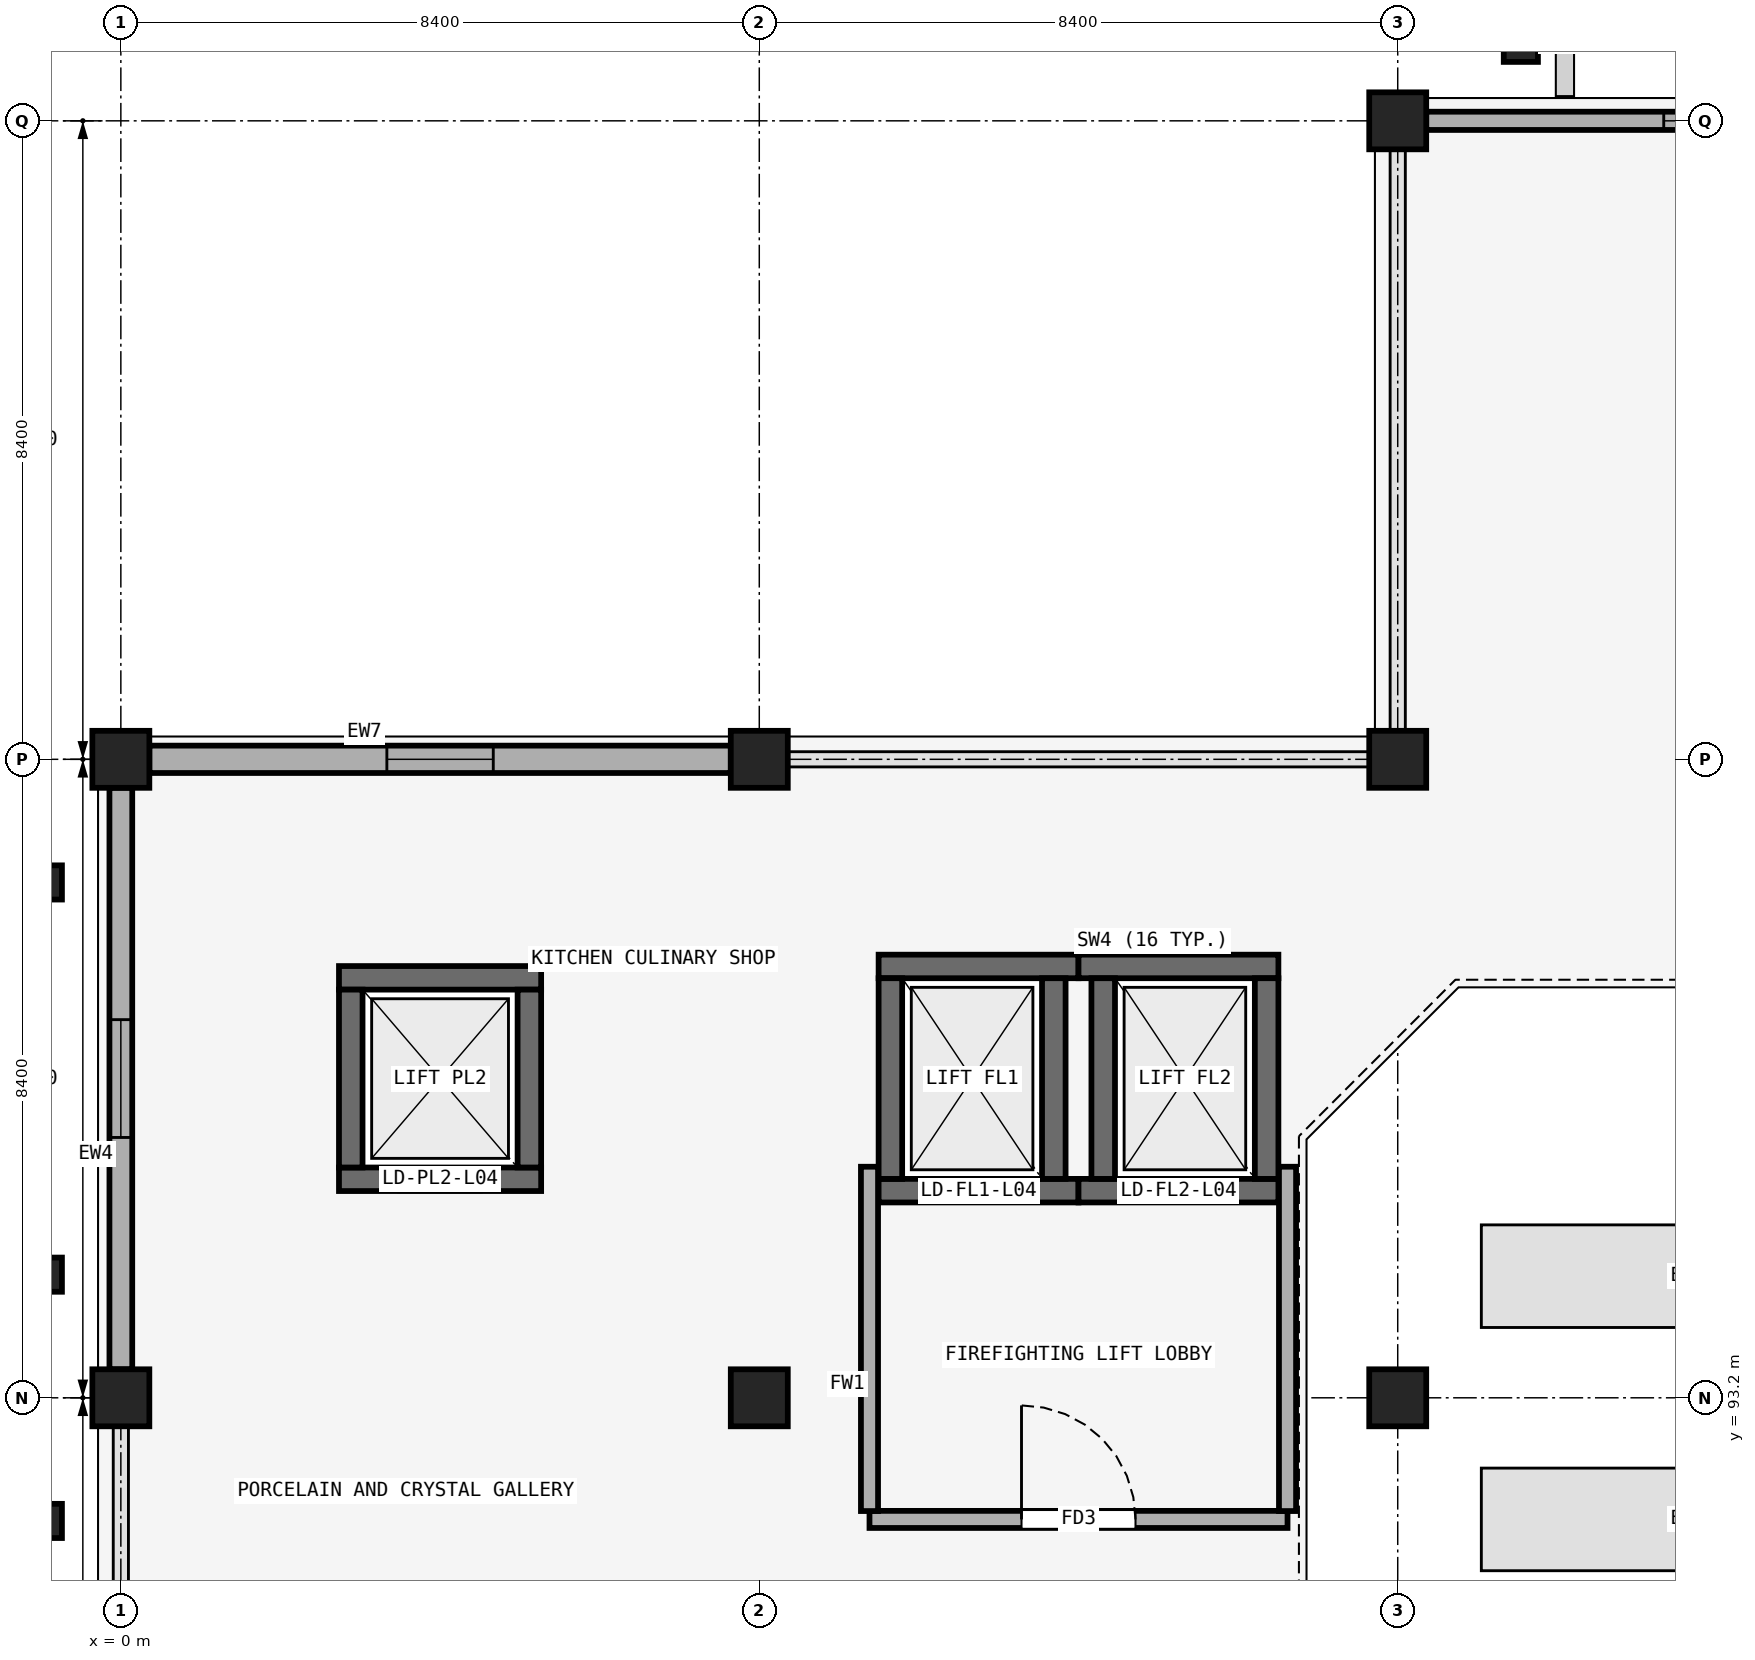
"""IFC4 building model, lengths in metres.
Left out: names, types, materials, properties, quantities, classifications, styles, units other than length and angle.
Written with IfcOpenShell. Run it as: python <this file> out.ifc"""

import sys

from ifc_helpers import new_model, si_unit, direction, frame, frame_2d, origin, origin_2d, place, context, subcontext, project, spatial, rectangle, extrude, element, fill, save


model = new_model("IFC4")
c1 = context("Model", 3, precision=1e-05, world=origin(), true_north=direction((0.0, 1.0)))
c2 = subcontext(c1, "Body", "Model", "MODEL_VIEW")
j1 = project(units=[si_unit("LENGTHUNIT", "METRE"), si_unit("PLANEANGLEUNIT", "RADIAN")], contexts=[c1])
p1 = place(None, origin())
s1 = spatial("IfcSite", under=j1, at=p1, CompositionType="ELEMENT")
p2 = place(p1, origin())
s2 = spatial("IfcBuilding", under=s1, at=p2, CompositionType="ELEMENT")
p3 = place(p2, frame((0.0, 0.0, 18.9)))
s3 = spatial("IfcBuildingStorey", under=s2, at=p3, CompositionType="ELEMENT", Elevation=18.9)
for number, where, z_axis, x_axis in (
    (1, (0.0, 93.2, 0.0), (0.0, 0.0, 1.0), (1.0, 0.0, 0.0)),
    (2, (8.4, 93.2, 0.0), (0.0, 0.0, 1.0), (1.0, 0.0, 0.0)),
    (3, (16.8, 93.2, 0.0), (0.0, 0.0, 1.0), (1.0, 0.0, 0.0)),
    (4, (0.0, 101.6, 0.0), (0.0, 0.0, 1.0), (1.0, 0.0, 0.0)),
    (5, (8.4, 101.6, 0.0), (0.0, 0.0, 1.0), (1.0, 0.0, 0.0)),
    (6, (16.8, 101.6, 0.0), (0.0, 0.0, 1.0), (1.0, 0.0, 0.0)),
    (7, (16.8, 110.0, 0.0), (0.0, 0.0, 1.0), (1.0, 0.0, 0.0)),
):
    element("IfcColumn", number, at=place(p3, frame(where, z_axis=z_axis, x_axis=x_axis)), inside=s3, PredefinedType="COLUMN", context=c2, shape_type="SweptSolid", body=[
        extrude(rectangle(XDim=0.75, YDim=0.75, at=origin_2d()), origin(), (0.0, 0.0, 1.0), 4.5),
    ])
for number, where, z_axis, x_axis in (
    (8, (18.42, 111.05, 0.0), (0.0, 0.0, 1.0), (1.0, 0.0, 0.0)),
    (9, (-1.05, 91.58, 0.0), (0.0, 0.0, 1.0), (0.0, 1.0, 0.0)),
    (10, (-1.05, 94.82, 0.0), (0.0, 0.0, 1.0), (0.0, 1.0, 0.0)),
    (11, (-1.05, 99.98, 0.0), (0.0, 0.0, 1.0), (0.0, 1.0, 0.0)),
):
    element("IfcColumn", number, at=place(p3, frame(where, z_axis=z_axis, x_axis=x_axis)), inside=s3, PredefinedType="PILASTER", context=c2, shape_type="SweptSolid", body=[
        extrude(rectangle(XDim=0.45, YDim=0.55, at=origin_2d()), origin(), (0.0, 0.0, 1.0), 4.5),
    ])
p4 = place(p3, frame((0.375, 101.6, 0.0), z_axis=(0.0, 0.0, 1.0), x_axis=(1.0, 0.0, 0.0)))
e12 = element("IfcWall", 12, at=p4, inside=s3, PredefinedType="SOLIDWALL", context=c2, shape_type="SweptSolid", body=[
    extrude(rectangle(XDim=7.65, YDim=0.36, at=frame_2d((3.825, 0.0))), origin(), (0.0, 0.0, 1.0), 3.45),
])
p5 = place(p4, frame((3.125, 0.0, 0.95)))
e13 = element("IfcOpeningElement", 13, at=p5, cuts=e12, PredefinedType="OPENING", context=c2, shape_type="SweptSolid", body=[
    extrude(rectangle(XDim=1.4, YDim=1.85, at=frame_2d((0.7, 0.925))), frame((0.0, 0.19, 0.0), z_axis=(0.0, -1.0, 0.0), x_axis=(1.0, 0.0, 0.0)), (0.0, 0.0, 1.0), 0.38),
])
p6 = place(p3, frame((17.175, 110.0, 0.0), z_axis=(0.0, 0.0, 1.0), x_axis=(1.0, 0.0, 0.0)))
e14 = element("IfcWall", 14, at=p6, inside=s3, PredefinedType="SOLIDWALL", context=c2, shape_type="SweptSolid", body=[
    extrude(rectangle(XDim=7.65, YDim=0.24, at=frame_2d((3.825, 0.0))), origin(), (0.0, 0.0, 1.0), 3.45),
])
p7 = place(p6, frame((3.125, 0.0, 0.95)))
e15 = element("IfcOpeningElement", 15, at=p7, cuts=e14, PredefinedType="OPENING", context=c2, shape_type="SweptSolid", body=[
    extrude(rectangle(XDim=1.4, YDim=2.1, at=frame_2d((0.7, 1.05))), frame((0.0, 0.13, 0.0), z_axis=(0.0, -1.0, 0.0), x_axis=(1.0, 0.0, 0.0)), (0.0, 0.0, 1.0), 0.26),
])
p8 = place(p3, frame((0.0, 93.575, 0.0), z_axis=(0.0, 0.0, 1.0), x_axis=(0.0, 1.0, 0.0)))
e16 = element("IfcWall", 16, at=p8, inside=s3, PredefinedType="SOLIDWALL", context=c2, shape_type="SweptSolid", body=[
    extrude(rectangle(XDim=7.65, YDim=0.3, at=frame_2d((3.825, 0.0))), origin(), (0.0, 0.0, 1.0), 3.45),
])
p9 = place(p8, frame((3.05, 0.0, 0.95)))
e17 = element("IfcOpeningElement", 17, at=p9, cuts=e16, PredefinedType="OPENING", context=c2, shape_type="SweptSolid", body=[
    extrude(rectangle(XDim=1.55, YDim=1.85, at=frame_2d((0.775, 0.925))), frame((0.0, 0.16, 0.0), z_axis=(0.0, -1.0, 0.0), x_axis=(1.0, 0.0, 0.0)), (0.0, 0.0, 1.0), 0.32),
])
p10 = place(p3, frame((9.97, 95.925, 0.0), z_axis=(0.0, 0.0, 1.0), x_axis=(1.0, 0.0, 0.0)))
e18 = element("IfcWall", 18, at=p10, inside=s3, PredefinedType="SHEAR", context=c2, shape_type="SweptSolid", body=[
    extrude(rectangle(XDim=2.63, YDim=0.31, at=frame_2d((1.315, 0.0))), origin(), (0.0, 0.0, 1.0), 4.2),
])
p11 = place(p10, frame((0.715, 0.0, 0.0)))
e19 = element("IfcOpeningElement", 19, at=p11, cuts=e18, PredefinedType="OPENING", context=c2, shape_type="SweptSolid", body=[
    extrude(rectangle(XDim=1.2, YDim=2.25, at=frame_2d((0.6, 1.125))), frame((0.0, 0.165, 0.0), z_axis=(0.0, -1.0, 0.0), x_axis=(1.0, 0.0, 0.0)), (0.0, 0.0, 1.0), 0.33),
])
p12 = place(p3, frame((9.97, 98.875, 0.0), z_axis=(0.0, 0.0, 1.0), x_axis=(1.0, 0.0, 0.0)))
e20 = element("IfcWall", 20, at=p12, inside=s3, PredefinedType="SHEAR", context=c2, shape_type="SweptSolid", body=[
    extrude(rectangle(XDim=2.63, YDim=0.31, at=frame_2d((1.315, 0.0))), origin(), (0.0, 0.0, 1.0), 4.2),
])
for number, where, z_axis, x_axis in (
    (21, (10.125, 96.08, 0.0), (0.0, 0.0, 1.0), (0.0, 1.0, 0.0)),
    (22, (12.275, 96.08, 0.0), (0.0, 0.0, 1.0), (0.0, 1.0, 0.0)),
):
    element("IfcWall", number, at=place(p3, frame(where, z_axis=z_axis, x_axis=x_axis)), inside=s3, PredefinedType="SHEAR", context=c2, shape_type="SweptSolid", body=[
        extrude(rectangle(XDim=2.64, YDim=0.31, at=frame_2d((1.32, 0.0))), origin(), (0.0, 0.0, 1.0), 4.2),
    ])
p13 = place(p3, frame((12.6, 95.925, 0.0), z_axis=(0.0, 0.0, 1.0), x_axis=(1.0, 0.0, 0.0)))
e23 = element("IfcWall", 23, at=p13, inside=s3, PredefinedType="SHEAR", context=c2, shape_type="SweptSolid", body=[
    extrude(rectangle(XDim=2.63, YDim=0.31, at=frame_2d((1.315, 0.0))), origin(), (0.0, 0.0, 1.0), 4.2),
])
p14 = place(p13, frame((0.715, 0.0, 0.0)))
e24 = element("IfcOpeningElement", 24, at=p14, cuts=e23, PredefinedType="OPENING", context=c2, shape_type="SweptSolid", body=[
    extrude(rectangle(XDim=1.2, YDim=2.25, at=frame_2d((0.6, 1.125))), frame((0.0, 0.165, 0.0), z_axis=(0.0, -1.0, 0.0), x_axis=(1.0, 0.0, 0.0)), (0.0, 0.0, 1.0), 0.33),
])
p15 = place(p3, frame((12.6, 98.875, 0.0), z_axis=(0.0, 0.0, 1.0), x_axis=(1.0, 0.0, 0.0)))
e25 = element("IfcWall", 25, at=p15, inside=s3, PredefinedType="SHEAR", context=c2, shape_type="SweptSolid", body=[
    extrude(rectangle(XDim=2.63, YDim=0.31, at=frame_2d((1.315, 0.0))), origin(), (0.0, 0.0, 1.0), 4.2),
])
for number, where, z_axis, x_axis in (
    (26, (12.925, 96.08, 0.0), (0.0, 0.0, 1.0), (0.0, 1.0, 0.0)),
    (27, (15.075, 96.08, 0.0), (0.0, 0.0, 1.0), (0.0, 1.0, 0.0)),
):
    element("IfcWall", number, at=place(p3, frame(where, z_axis=z_axis, x_axis=x_axis)), inside=s3, PredefinedType="SHEAR", context=c2, shape_type="SweptSolid", body=[
        extrude(rectangle(XDim=2.64, YDim=0.31, at=frame_2d((1.32, 0.0))), origin(), (0.0, 0.0, 1.0), 4.2),
    ])
p16 = place(p3, frame((2.87, 96.075, 0.0), z_axis=(0.0, 0.0, 1.0), x_axis=(1.0, 0.0, 0.0)))
e28 = element("IfcWall", 28, at=p16, inside=s3, PredefinedType="SHEAR", context=c2, shape_type="SweptSolid", body=[
    extrude(rectangle(XDim=2.66, YDim=0.31, at=frame_2d((1.33, 0.0))), origin(), (0.0, 0.0, 1.0), 4.2),
])
p17 = place(p16, frame((0.78, 0.0, 0.0)))
e29 = element("IfcOpeningElement", 29, at=p17, cuts=e28, PredefinedType="OPENING", context=c2, shape_type="SweptSolid", body=[
    extrude(rectangle(XDim=1.1, YDim=2.2, at=frame_2d((0.55, 1.1))), frame((0.0, 0.165, 0.0), z_axis=(0.0, -1.0, 0.0), x_axis=(1.0, 0.0, 0.0)), (0.0, 0.0, 1.0), 0.33),
])
p18 = place(p3, frame((2.87, 98.725, 0.0), z_axis=(0.0, 0.0, 1.0), x_axis=(1.0, 0.0, 0.0)))
e30 = element("IfcWall", 30, at=p18, inside=s3, PredefinedType="SHEAR", context=c2, shape_type="SweptSolid", body=[
    extrude(rectangle(XDim=2.66, YDim=0.31, at=frame_2d((1.33, 0.0))), origin(), (0.0, 0.0, 1.0), 4.2),
])
for number, where, z_axis, x_axis in (
    (31, (3.025, 96.23, 0.0), (0.0, 0.0, 1.0), (0.0, 1.0, 0.0)),
    (32, (5.375, 96.23, 0.0), (0.0, 0.0, 1.0), (0.0, 1.0, 0.0)),
):
    element("IfcWall", number, at=place(p3, frame(where, z_axis=z_axis, x_axis=x_axis)), inside=s3, PredefinedType="SHEAR", context=c2, shape_type="SweptSolid", body=[
        extrude(rectangle(XDim=2.34, YDim=0.31, at=frame_2d((1.17, 0.0))), origin(), (0.0, 0.0, 1.0), 4.2),
    ])
p19 = place(p3, frame((9.85, 91.6, 0.0), z_axis=(0.0, 0.0, 1.0), x_axis=(1.0, 0.0, 0.0)))
e33 = element("IfcWall", 33, at=p19, inside=s3, PredefinedType="PARTITIONING", context=c2, shape_type="SweptSolid", body=[
    extrude(rectangle(XDim=5.5, YDim=0.225, at=frame_2d((2.75, 0.0))), origin(), (0.0, 0.0, 1.0), 4.2),
])
p20 = place(p19, frame((2.0, 0.0, 0.0)))
e34 = element("IfcOpeningElement", 34, at=p20, cuts=e33, PredefinedType="OPENING", context=c2, shape_type="SweptSolid", body=[
    extrude(rectangle(XDim=1.5, YDim=2.25, at=frame_2d((0.75, 1.125))), frame((0.0, 0.123, 0.0), z_axis=(0.0, -1.0, 0.0), x_axis=(1.0, 0.0, 0.0)), (0.0, 0.0, 1.0), 0.245),
])
for number, where, z_axis, x_axis in (
    (35, (9.85, 91.71, 0.0), (0.0, 0.0, 1.0), (0.0, 1.0, 0.0)),
    (36, (15.35, 91.71, 0.0), (0.0, 0.0, 1.0), (0.0, 1.0, 0.0)),
):
    element("IfcWall", number, at=place(p3, frame(where, z_axis=z_axis, x_axis=x_axis)), inside=s3, PredefinedType="PARTITIONING", context=c2, shape_type="SweptSolid", body=[
        extrude(rectangle(XDim=4.53, YDim=0.225, at=frame_2d((2.265, 0.0))), origin(), (0.0, 0.0, 1.0), 3.5),
    ])
p21 = place(p5, origin())
e37 = element("IfcWindow", 37, at=p21, inside=s3, PartitioningType="SINGLE_PANEL", PredefinedType="WINDOW", context=c2, shape_type="SweptSolid", body=[
    extrude(rectangle(XDim=1.4, YDim=1.85, at=frame_2d((0.7, 0.925))), frame((0.0, 0.03, 0.0), z_axis=(0.0, -1.0, 0.0), x_axis=(1.0, 0.0, 0.0)), (0.0, 0.0, 1.0), 0.06),
])
fill(e13, e37)
p22 = place(p7, origin())
e38 = element("IfcWindow", 38, at=p22, inside=s3, PartitioningType="SINGLE_PANEL", PredefinedType="WINDOW", context=c2, shape_type="SweptSolid", body=[
    extrude(rectangle(XDim=1.4, YDim=2.1, at=frame_2d((0.7, 1.05))), frame((0.0, 0.03, 0.0), z_axis=(0.0, -1.0, 0.0), x_axis=(1.0, 0.0, 0.0)), (0.0, 0.0, 1.0), 0.06),
])
fill(e15, e38)
p23 = place(p9, origin())
e39 = element("IfcWindow", 39, at=p23, inside=s3, PartitioningType="SINGLE_PANEL", PredefinedType="WINDOW", context=c2, shape_type="SweptSolid", body=[
    extrude(rectangle(XDim=1.55, YDim=1.85, at=frame_2d((0.775, 0.925))), frame((0.0, 0.03, 0.0), z_axis=(0.0, -1.0, 0.0), x_axis=(1.0, 0.0, 0.0)), (0.0, 0.0, 1.0), 0.06),
])
fill(e17, e39)
p24 = place(p11, origin())
e40 = element("IfcDoor", 40, at=p24, inside=s3, OperationType="SLIDING_TO_LEFT", PredefinedType="DOOR", context=c2, shape_type="SweptSolid", body=[
    extrude(rectangle(XDim=1.2, YDim=2.25, at=frame_2d((0.6, 1.125))), frame((0.0, 0.025, 0.0), z_axis=(0.0, -1.0, 0.0), x_axis=(1.0, 0.0, 0.0)), (0.0, 0.0, 1.0), 0.05),
])
fill(e19, e40)
p25 = place(p14, origin())
e41 = element("IfcDoor", 41, at=p25, inside=s3, OperationType="SLIDING_TO_LEFT", PredefinedType="DOOR", context=c2, shape_type="SweptSolid", body=[
    extrude(rectangle(XDim=1.2, YDim=2.25, at=frame_2d((0.6, 1.125))), frame((0.0, 0.025, 0.0), z_axis=(0.0, -1.0, 0.0), x_axis=(1.0, 0.0, 0.0)), (0.0, 0.0, 1.0), 0.05),
])
fill(e24, e41)
p26 = place(p17, origin())
e42 = element("IfcDoor", 42, at=p26, inside=s3, OperationType="SLIDING_TO_LEFT", PredefinedType="DOOR", context=c2, shape_type="SweptSolid", body=[
    extrude(rectangle(XDim=1.1, YDim=2.2, at=frame_2d((0.55, 1.1))), frame((0.0, 0.025, 0.0), z_axis=(0.0, -1.0, 0.0), x_axis=(1.0, 0.0, 0.0)), (0.0, 0.0, 1.0), 0.05),
])
fill(e29, e42)
p27 = place(p20, origin())
e43 = element("IfcDoor", 43, at=p27, inside=s3, OperationType="SINGLE_SWING_LEFT", PredefinedType="DOOR", context=c2, shape_type="SweptSolid", body=[
    extrude(rectangle(XDim=1.5, YDim=2.25, at=frame_2d((0.75, 1.125))), frame((0.0, 0.025, 0.0), z_axis=(0.0, -1.0, 0.0), x_axis=(1.0, 0.0, 0.0)), (0.0, 0.0, 1.0), 0.05),
])
fill(e34, e43)
save(model, sys.argv[1])
